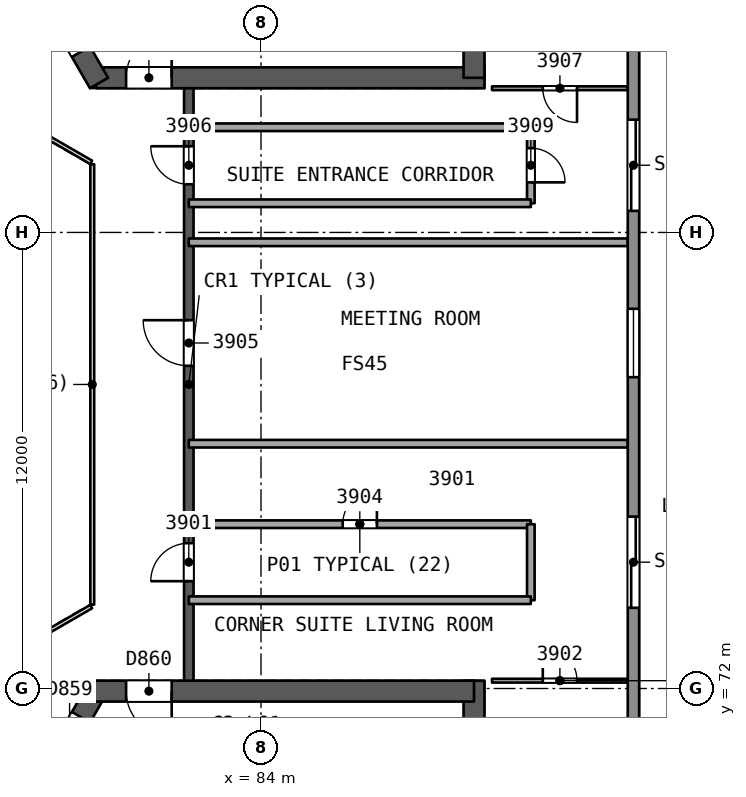
"""IFC4 building model, lengths in metres.
Left out: names, types, materials, properties, quantities, classifications, styles, units other than length and angle.
Written with IfcOpenShell. Run it as: python <this file> out.ifc"""

import sys

from ifc_helpers import new_model, si_unit, direction, frame, frame_2d, origin, place, context, subcontext, project, spatial, rectangle, extrude, element, fill, save


model = new_model("IFC4")
c1 = context("Model", 3, precision=1e-05, world=origin(), true_north=direction((0.0, 1.0)))
c2 = subcontext(c1, "Body", "Model", "MODEL_VIEW")
j1 = project(units=[si_unit("LENGTHUNIT", "METRE"), si_unit("PLANEANGLEUNIT", "RADIAN")], contexts=[c1])
p1 = place(None, origin())
s1 = spatial("IfcSite", under=j1, at=p1, CompositionType="ELEMENT")
p2 = place(p1, origin())
s2 = spatial("IfcBuilding", under=s1, at=p2, CompositionType="ELEMENT")
p3 = place(p2, frame((0.0, 0.0, 163.7)))
s3 = spatial("IfcBuildingStorey", under=s2, at=p3, CompositionType="ELEMENT", Elevation=163.7)
p4 = place(p3, frame((79.659, 88.069, 0.0), z_axis=(0.0, 0.0, 1.0), x_axis=(1.0, 0.0, 0.0)))
e1 = element("IfcWall", 1, at=p4, inside=s3, PredefinedType="SHEAR", context=c2, shape_type="SweptSolid", body=[
    extrude(rectangle(XDim=10.221, YDim=0.55, at=frame_2d((5.111, 0.0))), origin(), (0.0, 0.0, 1.0), 3.7),
])
p5 = place(p4, frame((0.791, 0.0, 0.0)))
e2 = element("IfcOpeningElement", 2, at=p5, cuts=e1, PredefinedType="OPENING", context=c2, shape_type="SweptSolid", body=[
    extrude(rectangle(XDim=1.2, YDim=2.1, at=frame_2d((0.6, 1.05))), frame((0.0, 0.286, 0.0), z_axis=(0.0, -1.0, 0.0), x_axis=(1.0, 0.0, 0.0)), (0.0, 0.0, 1.0), 0.571),
])
p6 = place(p3, frame((89.605, 88.069, 0.0), z_axis=(0.0, 0.0, 1.0), x_axis=(0.0, 1.0, 0.0)))
e3 = element("IfcWall", 3, at=p6, inside=s3, PredefinedType="SHEAR", context=c2, shape_type="SweptSolid", body=[
    extrude(rectangle(XDim=14.058, YDim=0.55, at=frame_2d((7.029, 0.0))), origin(), (0.0, 0.0, 1.0), 3.7),
])
p7 = place(p3, frame((74.686, 96.683, 0.0), z_axis=(0.0, 0.0, 1.0), x_axis=(0.499997818338, -0.866026663364, 0.0)))
e4 = element("IfcWall", 4, at=p7, inside=s3, PredefinedType="SHEAR", context=c2, shape_type="SweptSolid", body=[
    extrude(rectangle(XDim=10.105, YDim=0.55, at=frame_2d((5.052, 0.0))), origin(), (0.0, 0.0, 1.0), 3.7),
])
p8 = place(p7, frame((7.955, 0.0, 0.0)))
e5 = element("IfcOpeningElement", 5, at=p8, cuts=e4, PredefinedType="OPENING", context=c2, shape_type="SweptSolid", body=[
    extrude(rectangle(XDim=1.2, YDim=2.1, at=frame_2d((0.6, 1.05))), frame((0.0, 0.286, 0.0), z_axis=(0.0, -1.0, 0.0), x_axis=(1.0, 0.0, 0.0)), (0.0, 0.0, 1.0), 0.571),
])
p9 = place(p3, frame((79.659, 71.931, 0.0), z_axis=(0.0, 0.0, 1.0), x_axis=(-0.500000202252, -0.866025287014, 0.0)))
e6 = element("IfcWall", 6, at=p9, inside=s3, PredefinedType="SHEAR", context=c2, shape_type="SweptSolid", body=[
    extrude(rectangle(XDim=10.221, YDim=0.55, at=frame_2d((5.111, 0.0))), origin(), (0.0, 0.0, 1.0), 3.7),
])
p10 = place(p9, frame((0.791, 0.0, 0.0)))
e7 = element("IfcOpeningElement", 7, at=p10, cuts=e6, PredefinedType="OPENING", context=c2, shape_type="SweptSolid", body=[
    extrude(rectangle(XDim=1.2, YDim=2.1, at=frame_2d((0.6, 1.05))), frame((0.0, 0.286, 0.0), z_axis=(0.0, -1.0, 0.0), x_axis=(1.0, 0.0, 0.0)), (0.0, 0.0, 1.0), 0.571),
])
p11 = place(p3, frame((89.605, 58.031, 0.0), z_axis=(0.0, 0.0, 1.0), x_axis=(0.0, 1.0, 0.0)))
e8 = element("IfcWall", 8, at=p11, inside=s3, PredefinedType="SHEAR", context=c2, shape_type="SweptSolid", body=[
    extrude(rectangle(XDim=14.175, YDim=0.55, at=frame_2d((7.087, 0.0))), origin(), (0.0, 0.0, 1.0), 3.7),
])
p12 = place(p3, frame((89.605, 71.931, 0.0), z_axis=(0.0, 0.0, 1.0), x_axis=(-1.0, 0.0, 0.0)))
e9 = element("IfcWall", 9, at=p12, inside=s3, PredefinedType="SHEAR", context=c2, shape_type="SweptSolid", body=[
    extrude(rectangle(XDim=10.105, YDim=0.55, at=frame_2d((5.052, 0.0))), origin(), (0.0, 0.0, 1.0), 3.7),
])
p13 = place(p12, frame((7.955, 0.0, 0.0)))
e10 = element("IfcOpeningElement", 10, at=p13, cuts=e9, PredefinedType="OPENING", context=c2, shape_type="SweptSolid", body=[
    extrude(rectangle(XDim=1.2, YDim=2.1, at=frame_2d((0.6, 1.05))), frame((0.0, 0.286, 0.0), z_axis=(0.0, -1.0, 0.0), x_axis=(1.0, 0.0, 0.0)), (0.0, 0.0, 1.0), 0.571),
])
p14 = place(p3, frame((82.1, 72.206, 0.0), z_axis=(0.0, 0.0, 1.0), x_axis=(0.0, 1.0, 0.0)))
e11 = element("IfcWall", 11, at=p14, inside=s3, PredefinedType="SHEAR", context=c2, shape_type="SweptSolid", body=[
    extrude(rectangle(XDim=15.588, YDim=0.25, at=frame_2d((7.794, 0.0))), origin(), (0.0, 0.0, 1.0), 3.25),
])
p15 = place(p14, frame((2.618, 0.0, 0.0)))
e12 = element("IfcOpeningElement", 12, at=p15, cuts=e11, PredefinedType="OPENING", context=c2, shape_type="SweptSolid", body=[
    extrude(rectangle(XDim=1.0, YDim=2.1, at=frame_2d((0.5, 1.05))), frame((0.0, 0.135, 0.0), z_axis=(0.0, -1.0, 0.0), x_axis=(1.0, 0.0, 0.0)), (0.0, 0.0, 1.0), 0.271),
])
p16 = place(p14, frame((8.285, 0.0, 0.0)))
e13 = element("IfcOpeningElement", 13, at=p16, cuts=e11, PredefinedType="OPENING", context=c2, shape_type="SweptSolid", body=[
    extrude(rectangle(XDim=1.2, YDim=2.4, at=frame_2d((0.6, 1.2))), frame((0.0, 0.135, 0.0), z_axis=(0.0, -1.0, 0.0), x_axis=(1.0, 0.0, 0.0)), (0.0, 0.0, 1.0), 0.271),
])
p17 = place(p14, frame((13.062, 0.0, 0.0)))
e14 = element("IfcOpeningElement", 14, at=p17, cuts=e11, PredefinedType="OPENING", context=c2, shape_type="SweptSolid", body=[
    extrude(rectangle(XDim=1.0, YDim=2.1, at=frame_2d((0.5, 1.05))), frame((0.0, 0.135, 0.0), z_axis=(0.0, -1.0, 0.0), x_axis=(1.0, 0.0, 0.0)), (0.0, 0.0, 1.0), 0.271),
])
p18 = place(p3, frame((90.079, 72.206, 0.0), z_axis=(0.0, 0.0, 1.0), x_axis=(1.0, 0.0, 0.0)))
e15 = element("IfcWall", 15, at=p18, inside=s3, PredefinedType="PARTITIONING", context=c2, shape_type="SweptSolid", body=[
    extrude(rectangle(XDim=3.573, YDim=0.1, at=frame_2d((1.786, 0.0))), origin(), (0.0, 0.0, 1.0), 3.25),
])
p19 = place(p18, frame((1.336, 0.0, 0.0)))
e16 = element("IfcOpeningElement", 16, at=p19, cuts=e15, PredefinedType="OPENING", context=c2, shape_type="SweptSolid", body=[
    extrude(rectangle(XDim=0.9, YDim=2.1, at=frame_2d((0.45, 1.05))), frame((0.0, 0.061, 0.0), z_axis=(0.0, -1.0, 0.0), x_axis=(1.0, 0.0, 0.0)), (0.0, 0.0, 1.0), 0.121),
])
p20 = place(p3, frame((82.1, 76.323, 0.0), z_axis=(0.0, 0.0, 1.0), x_axis=(1.0, 0.0, 0.0)))
e17 = element("IfcWall", 17, at=p20, inside=s3, PredefinedType="PARTITIONING", context=c2, shape_type="SweptSolid", body=[
    extrude(rectangle(XDim=9.0, YDim=0.2, at=frame_2d((4.5, 0.0))), origin(), (0.0, 0.0, 1.0), 3.25),
])
p21 = place(p20, frame((4.05, 0.0, 0.0)))
e18 = element("IfcOpeningElement", 18, at=p21, cuts=e17, PredefinedType="OPENING", context=c2, shape_type="SweptSolid", body=[
    extrude(rectangle(XDim=0.9, YDim=2.1, at=frame_2d((0.45, 1.05))), frame((0.0, 0.11, 0.0), z_axis=(0.0, -1.0, 0.0), x_axis=(1.0, 0.0, 0.0)), (0.0, 0.0, 1.0), 0.221),
])
p22 = place(p3, frame((91.1, 76.323, 0.0), z_axis=(0.0, 0.0, 1.0), x_axis=(0.0, -1.0, 0.0)))
e19 = element("IfcWall", 19, at=p22, inside=s3, PredefinedType="PARTITIONING", context=c2, shape_type="SweptSolid", body=[
    extrude(rectangle(XDim=2.0, YDim=0.2, at=frame_2d((1.0, 0.0))), origin(), (0.0, 0.0, 1.0), 3.25),
])
p23 = place(p3, frame((91.1, 74.323, 0.0), z_axis=(0.0, 0.0, 1.0), x_axis=(-1.0, 0.0, 0.0)))
e20 = element("IfcWall", 20, at=p23, inside=s3, PredefinedType="PARTITIONING", context=c2, shape_type="SweptSolid", body=[
    extrude(rectangle(XDim=9.0, YDim=0.2, at=frame_2d((4.5, 0.0))), origin(), (0.0, 0.0, 1.0), 3.25),
])
for number, where, z_axis, x_axis in (
    (21, (93.652, 78.441, 0.0), (0.0, 0.0, 1.0), (-1.0, 0.0, 0.0)),
    (22, (93.652, 83.741, 0.0), (0.0, 0.0, 1.0), (-1.0, 0.0, 0.0)),
):
    element("IfcWall", number, at=place(p3, frame(where, z_axis=z_axis, x_axis=x_axis)), inside=s3, PredefinedType="PARTITIONING", context=c2, shape_type="SweptSolid", body=[
        extrude(rectangle(XDim=11.552, YDim=0.2, at=frame_2d((5.776, 0.0))), origin(), (0.0, 0.0, 1.0), 3.25),
    ])
p24 = place(p3, frame((93.652, 87.794, 0.0), z_axis=(0.0, 0.0, 1.0), x_axis=(-1.0, 0.0, 0.0)))
e23 = element("IfcWall", 23, at=p24, inside=s3, PredefinedType="PARTITIONING", context=c2, shape_type="SweptSolid", body=[
    extrude(rectangle(XDim=3.573, YDim=0.1, at=frame_2d((1.786, 0.0))), origin(), (0.0, 0.0, 1.0), 3.25),
])
p25 = place(p24, frame((1.336, 0.0, 0.0)))
e24 = element("IfcOpeningElement", 24, at=p25, cuts=e23, PredefinedType="OPENING", context=c2, shape_type="SweptSolid", body=[
    extrude(rectangle(XDim=0.9, YDim=2.1, at=frame_2d((0.45, 1.05))), frame((0.0, 0.061, 0.0), z_axis=(0.0, -1.0, 0.0), x_axis=(1.0, 0.0, 0.0)), (0.0, 0.0, 1.0), 0.121),
])
p26 = place(p3, frame((82.1, 86.768, 0.0), z_axis=(0.0, 0.0, 1.0), x_axis=(1.0, 0.0, 0.0)))
e25 = element("IfcWall", 25, at=p26, inside=s3, PredefinedType="PARTITIONING", context=c2, shape_type="SweptSolid", body=[
    extrude(rectangle(XDim=9.0, YDim=0.2, at=frame_2d((4.5, 0.0))), origin(), (0.0, 0.0, 1.0), 3.25),
])
p27 = place(p3, frame((91.1, 86.768, 0.0), z_axis=(0.0, 0.0, 1.0), x_axis=(0.0, -1.0, 0.0)))
e26 = element("IfcWall", 26, at=p27, inside=s3, PredefinedType="PARTITIONING", context=c2, shape_type="SweptSolid", body=[
    extrude(rectangle(XDim=2.0, YDim=0.2, at=frame_2d((1.0, 0.0))), origin(), (0.0, 0.0, 1.0), 3.25),
])
p28 = place(p27, frame((0.55, 0.0, 0.0)))
e27 = element("IfcOpeningElement", 27, at=p28, cuts=e26, PredefinedType="OPENING", context=c2, shape_type="SweptSolid", body=[
    extrude(rectangle(XDim=0.9, YDim=2.1, at=frame_2d((0.45, 1.05))), frame((0.0, 0.11, 0.0), z_axis=(0.0, -1.0, 0.0), x_axis=(1.0, 0.0, 0.0)), (0.0, 0.0, 1.0), 0.221),
])
p29 = place(p3, frame((91.1, 84.768, 0.0), z_axis=(0.0, 0.0, 1.0), x_axis=(-1.0, 0.0, 0.0)))
e28 = element("IfcWall", 28, at=p29, inside=s3, PredefinedType="PARTITIONING", context=c2, shape_type="SweptSolid", body=[
    extrude(rectangle(XDim=9.0, YDim=0.2, at=frame_2d((4.5, 0.0))), origin(), (0.0, 0.0, 1.0), 3.25),
])
p30 = place(p3, frame((93.801, 107.032, 0.0), z_axis=(0.0, 0.0, 1.0), x_axis=(0.0, -1.0, 0.0)))
e29 = element("IfcWall", 29, at=p30, inside=s3, PredefinedType="SOLIDWALL", context=c2, shape_type="SweptSolid", body=[
    extrude(rectangle(XDim=54.064, YDim=0.3, at=frame_2d((27.032, 0.0))), origin(), (0.0, 0.0, 1.0), 3.25),
])
p31 = place(p30, frame((30.509, 0.0, 0.0)))
e30 = element("IfcOpeningElement", 30, at=p31, cuts=e29, PredefinedType="OPENING", context=c2, shape_type="SweptSolid", body=[
    extrude(rectangle(XDim=2.4, YDim=2.4, at=frame_2d((1.2, 1.2))), frame((0.0, 0.161, 0.0), z_axis=(0.0, -1.0, 0.0), x_axis=(1.0, 0.0, 0.0)), (0.0, 0.0, 1.0), 0.321),
])
p32 = place(p30, frame((42.011, 0.0, 0.0)))
e31 = element("IfcOpeningElement", 31, at=p32, cuts=e29, PredefinedType="OPENING", context=c2, shape_type="SweptSolid", body=[
    extrude(rectangle(XDim=2.4, YDim=2.4, at=frame_2d((1.2, 1.2))), frame((0.0, 0.161, 0.0), z_axis=(0.0, -1.0, 0.0), x_axis=(1.0, 0.0, 0.0)), (0.0, 0.0, 1.0), 0.321),
])
p33 = place(p30, frame((20.065, 0.0, 0.0)))
e32 = element("IfcOpeningElement", 32, at=p33, cuts=e29, PredefinedType="OPENING", context=c2, shape_type="SweptSolid", body=[
    extrude(rectangle(XDim=2.4, YDim=2.4, at=frame_2d((1.2, 1.2))), frame((0.0, 0.161, 0.0), z_axis=(0.0, -1.0, 0.0), x_axis=(1.0, 0.0, 0.0)), (0.0, 0.0, 1.0), 0.321),
])
p34 = place(p30, frame((9.629, 0.0, 0.0)))
e33 = element("IfcOpeningElement", 33, at=p34, cuts=e29, PredefinedType="OPENING", context=c2, shape_type="SweptSolid", body=[
    extrude(rectangle(XDim=2.4, YDim=2.4, at=frame_2d((1.2, 1.2))), frame((0.0, 0.161, 0.0), z_axis=(0.0, -1.0, 0.0), x_axis=(1.0, 0.0, 0.0)), (0.0, 0.0, 1.0), 0.321),
])
p35 = place(p30, frame((25.041, 0.0, 0.9)))
e34 = element("IfcOpeningElement", 34, at=p35, cuts=e29, PredefinedType="OPENING", context=c2, shape_type="SweptSolid", body=[
    extrude(rectangle(XDim=1.8, YDim=1.5, at=frame_2d((0.9, 0.75))), frame((0.0, 0.161, 0.0), z_axis=(0.0, -1.0, 0.0), x_axis=(1.0, 0.0, 0.0)), (0.0, 0.0, 1.0), 0.321),
])
p36 = place(p3, frame((42.189, 82.766, 0.0), z_axis=(0.0, 0.0, 1.0), x_axis=(0.866025862562, 0.499999205373, 0.0)))
e35 = element("IfcWall", 35, at=p36, inside=s3, PredefinedType="SOLIDWALL", context=c2, shape_type="SweptSolid", body=[
    extrude(rectangle(XDim=54.064, YDim=0.3, at=frame_2d((27.032, 0.0))), origin(), (0.0, 0.0, 1.0), 3.25),
])
p37 = place(p36, frame((20.688, 0.0, 0.0)))
e36 = element("IfcOpeningElement", 36, at=p37, cuts=e35, PredefinedType="OPENING", context=c2, shape_type="SweptSolid", body=[
    extrude(rectangle(XDim=2.4, YDim=2.4, at=frame_2d((1.2, 1.2))), frame((0.0, 0.161, 0.0), z_axis=(0.0, -1.0, 0.0), x_axis=(1.0, 0.0, 0.0)), (0.0, 0.0, 1.0), 0.321),
])
p38 = place(p36, frame((9.629, 0.0, 0.0)))
e37 = element("IfcOpeningElement", 37, at=p38, cuts=e35, PredefinedType="OPENING", context=c2, shape_type="SweptSolid", body=[
    extrude(rectangle(XDim=2.4, YDim=2.4, at=frame_2d((1.2, 1.2))), frame((0.0, 0.161, 0.0), z_axis=(0.0, -1.0, 0.0), x_axis=(1.0, 0.0, 0.0)), (0.0, 0.0, 1.0), 0.321),
])
p39 = place(p36, frame((40.951, 0.0, 0.0)))
e38 = element("IfcOpeningElement", 38, at=p39, cuts=e35, PredefinedType="OPENING", context=c2, shape_type="SweptSolid", body=[
    extrude(rectangle(XDim=2.4, YDim=2.4, at=frame_2d((1.2, 1.2))), frame((0.0, 0.161, 0.0), z_axis=(0.0, -1.0, 0.0), x_axis=(1.0, 0.0, 0.0)), (0.0, 0.0, 1.0), 0.321),
])
p40 = place(p36, frame((27.847, 0.0, 0.9)))
e39 = element("IfcOpeningElement", 39, at=p40, cuts=e35, PredefinedType="OPENING", context=c2, shape_type="SweptSolid", body=[
    extrude(rectangle(XDim=1.8, YDim=1.5, at=frame_2d((0.9, 0.75))), frame((0.0, 0.161, 0.0), z_axis=(0.0, -1.0, 0.0), x_axis=(1.0, 0.0, 0.0)), (0.0, 0.0, 1.0), 0.321),
])
p41 = place(p36, frame((25.041, 0.0, 0.9)))
e40 = element("IfcOpeningElement", 40, at=p41, cuts=e35, PredefinedType="OPENING", context=c2, shape_type="SweptSolid", body=[
    extrude(rectangle(XDim=1.8, YDim=1.5, at=frame_2d((0.9, 0.75))), frame((0.0, 0.161, 0.0), z_axis=(0.0, -1.0, 0.0), x_axis=(1.0, 0.0, 0.0)), (0.0, 0.0, 1.0), 0.321),
])
p42 = place(p3, frame((89.01, 50.202, 0.0), z_axis=(0.0, 0.0, 1.0), x_axis=(-0.866025862562, 0.499999205373, 0.0)))
e41 = element("IfcWall", 41, at=p42, inside=s3, PredefinedType="SOLIDWALL", context=c2, shape_type="SweptSolid", body=[
    extrude(rectangle(XDim=54.064, YDim=0.3, at=frame_2d((27.032, 0.0))), origin(), (0.0, 0.0, 1.0), 3.25),
])
p43 = place(p42, frame((30.665, 0.0, 0.0)))
e42 = element("IfcOpeningElement", 42, at=p43, cuts=e41, PredefinedType="OPENING", context=c2, shape_type="SweptSolid", body=[
    extrude(rectangle(XDim=2.4, YDim=2.4, at=frame_2d((1.2, 1.2))), frame((0.0, 0.161, 0.0), z_axis=(0.0, -1.0, 0.0), x_axis=(1.0, 0.0, 0.0)), (0.0, 0.0, 1.0), 0.321),
])
p44 = place(p42, frame((42.011, 0.0, 0.0)))
e43 = element("IfcOpeningElement", 43, at=p44, cuts=e41, PredefinedType="OPENING", context=c2, shape_type="SweptSolid", body=[
    extrude(rectangle(XDim=2.4, YDim=2.4, at=frame_2d((1.2, 1.2))), frame((0.0, 0.161, 0.0), z_axis=(0.0, -1.0, 0.0), x_axis=(1.0, 0.0, 0.0)), (0.0, 0.0, 1.0), 0.321),
])
p45 = place(p42, frame((10.402, 0.0, 0.0)))
e44 = element("IfcOpeningElement", 44, at=p45, cuts=e41, PredefinedType="OPENING", context=c2, shape_type="SweptSolid", body=[
    extrude(rectangle(XDim=2.4, YDim=2.4, at=frame_2d((1.2, 1.2))), frame((0.0, 0.161, 0.0), z_axis=(0.0, -1.0, 0.0), x_axis=(1.0, 0.0, 0.0)), (0.0, 0.0, 1.0), 0.321),
])
p46 = place(p42, frame((25.197, 0.0, 0.9)))
e45 = element("IfcOpeningElement", 45, at=p46, cuts=e41, PredefinedType="OPENING", context=c2, shape_type="SweptSolid", body=[
    extrude(rectangle(XDim=1.8, YDim=1.5, at=frame_2d((0.9, 0.75))), frame((0.0, 0.161, 0.0), z_axis=(0.0, -1.0, 0.0), x_axis=(1.0, 0.0, 0.0)), (0.0, 0.0, 1.0), 0.321),
])
p47 = place(p3, frame((79.56, 74.206, 0.0), z_axis=(0.0, 0.0, 1.0), x_axis=(0.0, 1.0, 0.0)))
e46 = element("IfcWall", 46, at=p47, inside=s3, PredefinedType="PARTITIONING", context=c2, shape_type="SweptSolid", body=[
    extrude(rectangle(XDim=11.588, YDim=0.1, at=frame_2d((5.794, 0.0))), origin(), (0.0, 0.0, 1.0), 3.25),
])
for number, where, z_axis, x_axis in (
    (47, (79.53, 85.846, 0.0), (0.0, 0.0, 1.0), (-0.866, 0.5, 0.0)),
    (48, (77.798, 73.154, 0.0), (0.0, 0.0, 1.0), (0.866, 0.5, 0.0)),
):
    element("IfcWall", number, at=place(p3, frame(where, z_axis=z_axis, x_axis=x_axis)), inside=s3, PredefinedType="PARTITIONING", context=c2, shape_type="SweptSolid", body=[
        extrude(rectangle(XDim=2.0, YDim=0.1, at=frame_2d((1.0, 0.0))), origin(), (0.0, 0.0, 1.0), 3.25),
    ])
p48 = place(p15, origin())
e49 = element("IfcDoor", 49, at=p48, inside=s3, OperationType="SINGLE_SWING_LEFT", PredefinedType="NOTDEFINED", context=c2, shape_type="SweptSolid", body=[
    extrude(rectangle(XDim=1.0, YDim=2.1, at=frame_2d((0.5, 1.05))), frame((0.0, 0.025, 0.0), z_axis=(0.0, -1.0, 0.0), x_axis=(1.0, 0.0, 0.0)), (0.0, 0.0, 1.0), 0.05),
])
fill(e12, e49)
p49 = place(p19, origin())
e50 = element("IfcDoor", 50, at=p49, inside=s3, OperationType="SINGLE_SWING_LEFT", PredefinedType="NOTDEFINED", context=c2, shape_type="SweptSolid", body=[
    extrude(rectangle(XDim=0.9, YDim=2.1, at=frame_2d((0.45, 1.05))), frame((0.0, 0.025, 0.0), z_axis=(0.0, -1.0, 0.0), x_axis=(1.0, 0.0, 0.0)), (0.0, 0.0, 1.0), 0.05),
])
fill(e16, e50)
p50 = place(p21, origin())
e51 = element("IfcDoor", 51, at=p50, inside=s3, OperationType="SINGLE_SWING_RIGHT", PredefinedType="NOTDEFINED", context=c2, shape_type="SweptSolid", body=[
    extrude(rectangle(XDim=0.9, YDim=2.1, at=frame_2d((0.45, 1.05))), frame((0.0, 0.025, 0.0), z_axis=(0.0, -1.0, 0.0), x_axis=(1.0, 0.0, 0.0)), (0.0, 0.0, 1.0), 0.05),
])
fill(e18, e51)
p51 = place(p16, origin())
e52 = element("IfcDoor", 52, at=p51, inside=s3, OperationType="SINGLE_SWING_RIGHT", PredefinedType="NOTDEFINED", context=c2, shape_type="SweptSolid", body=[
    extrude(rectangle(XDim=1.2, YDim=2.4, at=frame_2d((0.6, 1.2))), frame((0.0, 0.025, 0.0), z_axis=(0.0, -1.0, 0.0), x_axis=(1.0, 0.0, 0.0)), (0.0, 0.0, 1.0), 0.05),
])
fill(e13, e52)
p52 = place(p17, origin())
e53 = element("IfcDoor", 53, at=p52, inside=s3, OperationType="SINGLE_SWING_RIGHT", PredefinedType="NOTDEFINED", context=c2, shape_type="SweptSolid", body=[
    extrude(rectangle(XDim=1.0, YDim=2.1, at=frame_2d((0.5, 1.05))), frame((0.0, 0.025, 0.0), z_axis=(0.0, -1.0, 0.0), x_axis=(1.0, 0.0, 0.0)), (0.0, 0.0, 1.0), 0.05),
])
fill(e14, e53)
p53 = place(p25, origin())
e54 = element("IfcDoor", 54, at=p53, inside=s3, OperationType="SINGLE_SWING_LEFT", PredefinedType="NOTDEFINED", context=c2, shape_type="SweptSolid", body=[
    extrude(rectangle(XDim=0.9, YDim=2.1, at=frame_2d((0.45, 1.05))), frame((0.0, 0.025, 0.0), z_axis=(0.0, -1.0, 0.0), x_axis=(1.0, 0.0, 0.0)), (0.0, 0.0, 1.0), 0.05),
])
fill(e24, e54)
p54 = place(p28, origin())
e55 = element("IfcDoor", 55, at=p54, inside=s3, OperationType="SINGLE_SWING_RIGHT", PredefinedType="NOTDEFINED", context=c2, shape_type="SweptSolid", body=[
    extrude(rectangle(XDim=0.9, YDim=2.1, at=frame_2d((0.45, 1.05))), frame((0.0, 0.025, 0.0), z_axis=(0.0, -1.0, 0.0), x_axis=(1.0, 0.0, 0.0)), (0.0, 0.0, 1.0), 0.05),
])
fill(e27, e55)
p55 = place(p31, origin())
e56 = element("IfcDoor", 56, at=p55, inside=s3, OperationType="SLIDING_TO_LEFT", PredefinedType="NOTDEFINED", context=c2, shape_type="SweptSolid", body=[
    extrude(rectangle(XDim=2.4, YDim=2.4, at=frame_2d((1.2, 1.2))), frame((0.0, 0.025, 0.0), z_axis=(0.0, -1.0, 0.0), x_axis=(1.0, 0.0, 0.0)), (0.0, 0.0, 1.0), 0.05),
])
fill(e30, e56)
p56 = place(p33, origin())
e57 = element("IfcDoor", 57, at=p56, inside=s3, OperationType="SLIDING_TO_LEFT", PredefinedType="NOTDEFINED", context=c2, shape_type="SweptSolid", body=[
    extrude(rectangle(XDim=2.4, YDim=2.4, at=frame_2d((1.2, 1.2))), frame((0.0, 0.025, 0.0), z_axis=(0.0, -1.0, 0.0), x_axis=(1.0, 0.0, 0.0)), (0.0, 0.0, 1.0), 0.05),
])
fill(e32, e57)
p57 = place(p35, origin())
e58 = element("IfcWindow", 58, at=p57, inside=s3, PartitioningType="SINGLE_PANEL", PredefinedType="WINDOW", context=c2, shape_type="SweptSolid", body=[
    extrude(rectangle(XDim=1.8, YDim=1.5, at=frame_2d((0.9, 0.75))), frame((0.0, 0.03, 0.0), z_axis=(0.0, -1.0, 0.0), x_axis=(1.0, 0.0, 0.0)), (0.0, 0.0, 1.0), 0.06),
])
fill(e34, e58)
p58 = place(p5, origin())
e59 = element("IfcDoor", 59, at=p58, inside=s3, OperationType="SINGLE_SWING_RIGHT", PredefinedType="NOTDEFINED", context=c2, shape_type="SweptSolid", body=[
    extrude(rectangle(XDim=1.2, YDim=2.1, at=frame_2d((0.6, 1.05))), frame((0.0, 0.025, 0.0), z_axis=(0.0, -1.0, 0.0), x_axis=(1.0, 0.0, 0.0)), (0.0, 0.0, 1.0), 0.05),
])
fill(e2, e59)
p59 = place(p8, origin())
e60 = element("IfcDoor", 60, at=p59, inside=s3, OperationType="SINGLE_SWING_LEFT", PredefinedType="NOTDEFINED", context=c2, shape_type="SweptSolid", body=[
    extrude(rectangle(XDim=1.2, YDim=2.1, at=frame_2d((0.6, 1.05))), frame((0.0, 0.025, 0.0), z_axis=(0.0, -1.0, 0.0), x_axis=(1.0, 0.0, 0.0)), (0.0, 0.0, 1.0), 0.05),
])
fill(e5, e60)
p60 = place(p10, origin())
e61 = element("IfcDoor", 61, at=p60, inside=s3, OperationType="SINGLE_SWING_RIGHT", PredefinedType="NOTDEFINED", context=c2, shape_type="SweptSolid", body=[
    extrude(rectangle(XDim=1.2, YDim=2.1, at=frame_2d((0.6, 1.05))), frame((0.0, 0.025, 0.0), z_axis=(0.0, -1.0, 0.0), x_axis=(1.0, 0.0, 0.0)), (0.0, 0.0, 1.0), 0.05),
])
fill(e7, e61)
p61 = place(p13, origin())
e62 = element("IfcDoor", 62, at=p61, inside=s3, OperationType="SINGLE_SWING_LEFT", PredefinedType="NOTDEFINED", context=c2, shape_type="SweptSolid", body=[
    extrude(rectangle(XDim=1.2, YDim=2.1, at=frame_2d((0.6, 1.05))), frame((0.0, 0.025, 0.0), z_axis=(0.0, -1.0, 0.0), x_axis=(1.0, 0.0, 0.0)), (0.0, 0.0, 1.0), 0.05),
])
fill(e10, e62)
save(model, sys.argv[1])
